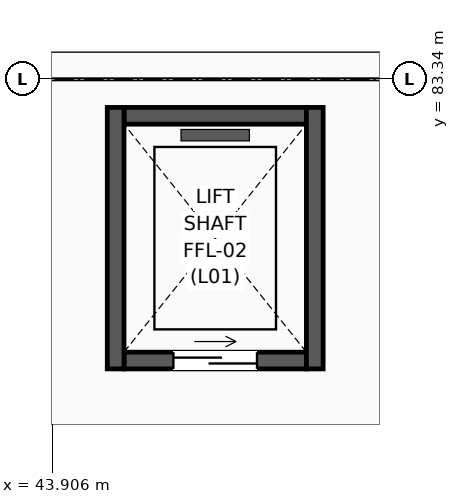
"""IFC4 building model, lengths in metres.
Left out: names, types, materials, properties, quantities, classifications, styles, units other than length and angle.
Written with IfcOpenShell. Run it as: python <this file> out.ifc"""

import sys

from ifc_helpers import new_model, si_unit, direction, frame, frame_2d, origin, place, context, subcontext, project, spatial, rectangle, extrude, element, fill, save


model = new_model("IFC4")
c1 = context("Model", 3, precision=1e-05, world=origin(), true_north=direction((0.0, 1.0)))
c2 = subcontext(c1, "Body", "Model", "MODEL_VIEW")
j1 = project(units=[si_unit("LENGTHUNIT", "METRE"), si_unit("PLANEANGLEUNIT", "RADIAN")], contexts=[c1])
p1 = place(None, origin())
s1 = spatial("IfcSite", under=j1, at=p1, CompositionType="ELEMENT")
p2 = place(p1, origin())
s2 = spatial("IfcBuilding", under=s1, at=p2, CompositionType="ELEMENT")
p3 = place(p2, frame((0.0, 0.0, 5.4)))
s3 = spatial("IfcBuildingStorey", under=s2, at=p3, CompositionType="ELEMENT", Elevation=5.4)
p4 = place(p3, frame((44.85, 79.64, 0.0), z_axis=(0.0, 0.0, 1.0), x_axis=(1.0, 0.0, 0.0)))
e1 = element("IfcWall", 1, at=p4, inside=s3, PredefinedType="SOLIDWALL", context=c2, shape_type="SweptSolid", body=[
    extrude(rectangle(XDim=2.4, YDim=0.22, at=frame_2d((1.2, 0.0))), origin(), (0.0, 0.0, 1.0), 4.525),
])
p5 = place(p4, frame((0.65, 0.0, 0.0)))
e2 = element("IfcOpeningElement", 2, at=p5, cuts=e1, PredefinedType="OPENING", context=c2, shape_type="SweptSolid", body=[
    extrude(rectangle(XDim=1.1, YDim=2.2, at=frame_2d((0.55, 1.1))), frame((0.0, 0.12, 0.0), z_axis=(0.0, -1.0, 0.0), x_axis=(1.0, 0.0, 0.0)), (0.0, 0.0, 1.0), 0.24),
])
p6 = place(p3, frame((44.85, 82.86, 0.0), z_axis=(0.0, 0.0, 1.0), x_axis=(1.0, 0.0, 0.0)))
e3 = element("IfcWall", 3, at=p6, inside=s3, PredefinedType="SOLIDWALL", context=c2, shape_type="SweptSolid", body=[
    extrude(rectangle(XDim=2.4, YDim=0.22, at=frame_2d((1.2, 0.0))), origin(), (0.0, 0.0, 1.0), 4.525),
])
for number, where, z_axis, x_axis in (
    (4, (44.74, 79.53, 0.0), (0.0, 0.0, 1.0), (0.0, 1.0, 0.0)),
    (5, (47.36, 79.53, 0.0), (0.0, 0.0, 1.0), (0.0, 1.0, 0.0)),
):
    element("IfcWall", number, at=place(p3, frame(where, z_axis=z_axis, x_axis=x_axis)), inside=s3, PredefinedType="SOLIDWALL", context=c2, shape_type="SweptSolid", body=[
        extrude(rectangle(XDim=3.44, YDim=0.22, at=frame_2d((1.72, 0.0))), origin(), (0.0, 0.0, 1.0), 4.525),
    ])
p7 = place(p5, origin())
e6 = element("IfcDoor", 6, at=p7, inside=s3, OperationType="SLIDING_TO_LEFT", PredefinedType="DOOR", context=c2, shape_type="SweptSolid", body=[
    extrude(rectangle(XDim=1.1, YDim=2.2, at=frame_2d((0.55, 1.1))), frame((0.0, 0.025, 0.0), z_axis=(0.0, -1.0, 0.0), x_axis=(1.0, 0.0, 0.0)), (0.0, 0.0, 1.0), 0.05),
])
fill(e2, e6)
save(model, sys.argv[1])
